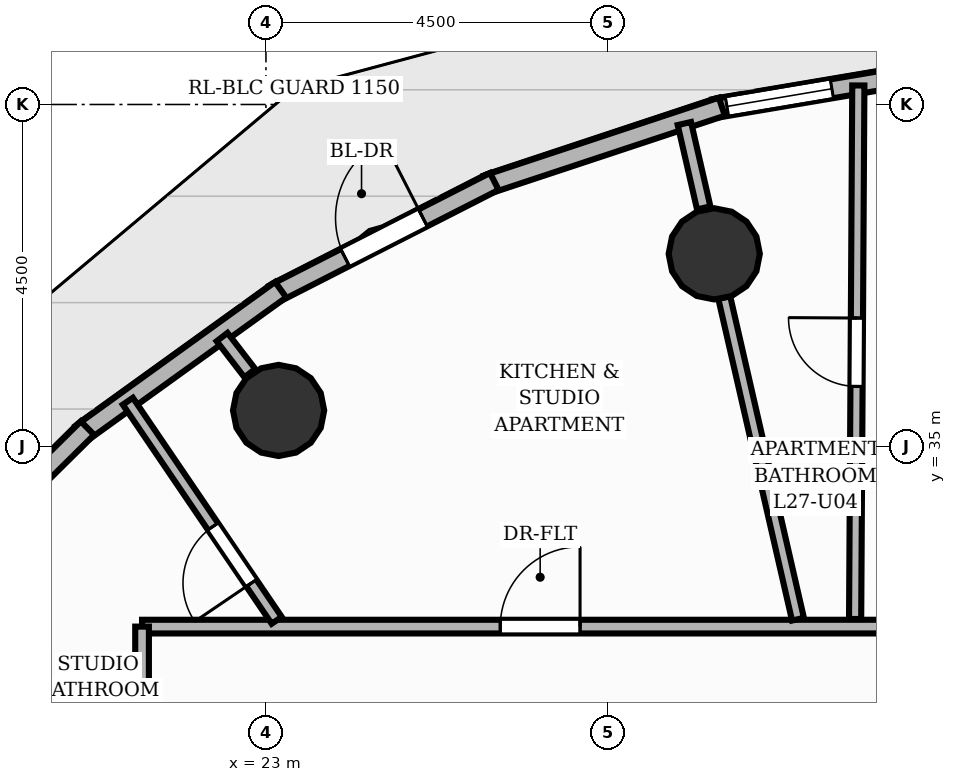
"""IFC4 building model, lengths in metres.
Left out: names, types, materials, properties, quantities, classifications, styles, units other than length and angle.
Written with IfcOpenShell. Run it as: python <this file> out.ifc"""

import sys

from ifc_helpers import new_model, si_unit, direction, frame, frame_2d, origin, origin_2d, place, context, subcontext, project, spatial, rectangle, circle, extrude, element, fill, save


model = new_model("IFC4")
c1 = context("Model", 3, precision=1e-05, world=origin(), true_north=direction((0.0, 1.0)))
c2 = subcontext(c1, "Body", "Model", "MODEL_VIEW")
j1 = project(units=[si_unit("LENGTHUNIT", "METRE"), si_unit("PLANEANGLEUNIT", "RADIAN")], contexts=[c1])
p1 = place(None, origin())
s1 = spatial("IfcSite", under=j1, at=p1, CompositionType="ELEMENT")
p2 = place(p1, origin())
s2 = spatial("IfcBuilding", under=s1, at=p2, CompositionType="ELEMENT")
p3 = place(p2, frame((0.0, 0.0, 93.28)))
s3 = spatial("IfcBuildingStorey", under=s2, at=p3, CompositionType="ELEMENT", Elevation=93.28)
for number, where, z_axis, x_axis in (
    (1, (28.898, 37.535, 0.0), (0.0, 0.0, 1.0), (1.0, 0.0, 0.0)),
    (2, (23.167, 35.474, 0.0), (0.0, 0.0, 1.0), (1.0, 0.0, 0.0)),
):
    element("IfcColumn", number, at=place(p3, frame(where, z_axis=z_axis, x_axis=x_axis)), inside=s3, PredefinedType="COLUMN", context=c2, shape_type="SweptSolid", body=[
        extrude(circle(Radius=0.6, at=origin_2d()), origin(), (0.0, 0.0, 1.0), 3.2),
    ])
p4 = place(p3, frame((28.893, 39.445, 0.0), z_axis=(0.0, 0.0, 1.0), x_axis=(0.986043062305, 0.166490478044, 0.0)))
e3 = element("IfcWall", 3, at=p4, inside=s3, PredefinedType="SOLIDWALL", context=c2, shape_type="SweptSolid", body=[
    extrude(rectangle(XDim=3.236, YDim=0.25, at=frame_2d((1.618, 0.0))), origin(), (0.0, 0.0, 1.0), 2.96),
])
p5 = place(p4, frame((0.175, 0.0, 0.85)))
e4 = element("IfcOpeningElement", 4, at=p5, cuts=e3, PredefinedType="OPENING", context=c2, shape_type="SweptSolid", body=[
    extrude(rectangle(XDim=1.4, YDim=1.55, at=frame_2d((0.7, 0.775))), frame((0.0, 0.135, 0.0), z_axis=(0.0, -1.0, 0.0), x_axis=(1.0, 0.0, 0.0)), (0.0, 0.0, 1.0), 0.27),
])
p6 = place(p3, frame((25.904, 38.445, 0.0), z_axis=(0.0, 0.0, 1.0), x_axis=(0.949206293356, 0.314654433709, 0.0)))
e5 = element("IfcWall", 5, at=p6, inside=s3, PredefinedType="SOLIDWALL", context=c2, shape_type="SweptSolid", body=[
    extrude(rectangle(XDim=3.26, YDim=0.25, at=frame_2d((1.63, 0.0))), origin(), (0.0, 0.0, 1.0), 2.96),
])
p7 = place(p3, frame((23.101, 37.006, 0.0), z_axis=(0.0, 0.0, 1.0), x_axis=(0.89081817606, 0.454359964347, 0.0)))
e6 = element("IfcWall", 6, at=p7, inside=s3, PredefinedType="SOLIDWALL", context=c2, shape_type="SweptSolid", body=[
    extrude(rectangle(XDim=3.26, YDim=0.25, at=frame_2d((1.63, 0.0))), origin(), (0.0, 0.0, 1.0), 2.96),
])
p8 = place(p7, frame((1.055, 0.0, 0.0)))
e7 = element("IfcOpeningElement", 7, at=p8, cuts=e6, PredefinedType="OPENING", context=c2, shape_type="SweptSolid", body=[
    extrude(rectangle(XDim=1.15, YDim=2.2, at=frame_2d((0.575, 1.1))), frame((0.0, 0.135, 0.0), z_axis=(0.0, -1.0, 0.0), x_axis=(1.0, 0.0, 0.0)), (0.0, 0.0, 1.0), 0.27),
])
p9 = place(p3, frame((20.568, 35.171, 0.0), z_axis=(0.0, 0.0, 1.0), x_axis=(0.81131534838, 0.584608762749, 0.0)))
e8 = element("IfcWall", 8, at=p9, inside=s3, PredefinedType="SOLIDWALL", context=c2, shape_type="SweptSolid", body=[
    extrude(rectangle(XDim=3.236, YDim=0.25, at=frame_2d((1.618, 0.0))), origin(), (0.0, 0.0, 1.0), 2.96),
])
p10 = place(p3, frame((18.384, 32.996, 0.0), z_axis=(0.0, 0.0, 1.0), x_axis=(0.710540573889, 0.703656232017, 0.0)))
e9 = element("IfcWall", 9, at=p10, inside=s3, PredefinedType="SOLIDWALL", context=c2, shape_type="SweptSolid", body=[
    extrude(rectangle(XDim=3.192, YDim=0.25, at=frame_2d((1.596, 0.0))), origin(), (0.0, 0.0, 1.0), 2.96),
])
p11 = place(p10, frame((0.771, 0.0, 0.85)))
e10 = element("IfcOpeningElement", 10, at=p11, cuts=e9, PredefinedType="OPENING", context=c2, shape_type="SweptSolid", body=[
    extrude(rectangle(XDim=1.65, YDim=1.55, at=frame_2d((0.825, 0.775))), frame((0.0, 0.135, 0.0), z_axis=(0.0, -1.0, 0.0), x_axis=(1.0, 0.0, 0.0)), (0.0, 0.0, 1.0), 0.27),
])
p12 = place(p3, frame((28.76, 38.139, 0.0), z_axis=(0.0, 0.0, 1.0), x_axis=(-0.223325248633, 0.974743983476, 0.0)))
e11 = element("IfcWall", 11, at=p12, inside=s3, PredefinedType="PARTITIONING", context=c2, shape_type="SweptSolid", body=[
    extrude(rectangle(XDim=1.139, YDim=0.18, at=frame_2d((0.57, 0.0))), origin(), (0.0, 0.0, 1.0), 2.26),
])
p13 = place(p3, frame((22.788, 35.966, 0.0), z_axis=(0.0, 0.0, 1.0), x_axis=(-0.609809319142, 0.792548165279, 0.0)))
e12 = element("IfcWall", 12, at=p13, inside=s3, PredefinedType="PARTITIONING", context=c2, shape_type="SweptSolid", body=[
    extrude(rectangle(XDim=0.599, YDim=0.18, at=frame_2d((0.299, 0.0))), origin(), (0.0, 0.0, 1.0), 2.26),
])
p14 = place(p3, frame((21.37, 32.63, 0.0), z_axis=(0.0, 0.0, 1.0), x_axis=(1.0, 0.0, 0.0)))
e13 = element("IfcWall", 13, at=p14, inside=s3, PredefinedType="PARTITIONING", context=c2, shape_type="SweptSolid", body=[
    extrude(rectangle(XDim=12.686, YDim=0.18, at=frame_2d((6.343, 0.0))), origin(), (0.0, 0.0, 1.0), 2.955),
])
p15 = place(p14, frame((10.499, 0.0, 0.0)))
e14 = element("IfcOpeningElement", 14, at=p15, cuts=e13, PredefinedType="OPENING", context=c2, shape_type="SweptSolid", body=[
    extrude(rectangle(XDim=1.05, YDim=2.15, at=frame_2d((0.525, 1.075))), frame((0.0, 0.1, 0.0), z_axis=(0.0, -1.0, 0.0), x_axis=(1.0, 0.0, 0.0)), (0.0, 0.0, 1.0), 0.2),
])
p16 = place(p14, frame((4.713, 0.0, 0.0)))
e15 = element("IfcOpeningElement", 15, at=p16, cuts=e13, PredefinedType="OPENING", context=c2, shape_type="SweptSolid", body=[
    extrude(rectangle(XDim=1.05, YDim=2.15, at=frame_2d((0.525, 1.075))), frame((0.0, 0.1, 0.0), z_axis=(0.0, -1.0, 0.0), x_axis=(1.0, 0.0, 0.0)), (0.0, 0.0, 1.0), 0.2),
])
p17 = place(p3, frame((21.37, 21.771, 0.0), z_axis=(0.0, 0.0, 1.0), x_axis=(0.0, 1.0, 0.0)))
e16 = element("IfcWall", 16, at=p17, inside=s3, PredefinedType="PARTITIONING", context=c2, shape_type="SweptSolid", body=[
    extrude(rectangle(XDim=10.859, YDim=0.18, at=frame_2d((5.43, 0.0))), origin(), (0.0, 0.0, 1.0), 2.955),
])
p18 = place(p3, frame((30.752, 32.73, 0.0), z_axis=(0.0, 0.0, 1.0), x_axis=(0.006016026892, 0.999981903546, 0.0)))
e17 = element("IfcWall", 17, at=p18, inside=s3, PredefinedType="PLUMBINGWALL", context=c2, shape_type="SweptSolid", body=[
    extrude(rectangle(XDim=7.021, YDim=0.16, at=frame_2d((3.51, 0.0))), origin(), (0.0, 0.0, 1.0), 2.955),
])
p19 = place(p18, frame((3.06, 0.0, 0.0)))
e18 = element("IfcOpeningElement", 18, at=p19, cuts=e17, PredefinedType="OPENING", context=c2, shape_type="SweptSolid", body=[
    extrude(rectangle(XDim=0.9, YDim=2.1, at=frame_2d((0.45, 1.05))), frame((0.0, 0.09, 0.0), z_axis=(0.0, -1.0, 0.0), x_axis=(1.0, 0.0, 0.0)), (0.0, 0.0, 1.0), 0.18),
])
p20 = place(p3, frame((30.0, 32.728, 0.0), z_axis=(0.0, 0.0, 1.0), x_axis=(-0.223409547543, 0.974724665773, 0.0)))
e19 = element("IfcWall", 19, at=p20, inside=s3, PredefinedType="PLUMBINGWALL", context=c2, shape_type="SweptSolid", body=[
    extrude(rectangle(XDim=4.342, YDim=0.16, at=frame_2d((2.171, 0.0))), origin(), (0.0, 0.0, 1.0), 2.26),
])
p21 = place(p3, frame((23.142, 32.713, 0.0), z_axis=(0.0, 0.0, 1.0), x_axis=(-0.561921019334, 0.827190889717, 0.0)))
e20 = element("IfcWall", 20, at=p21, inside=s3, PredefinedType="PLUMBINGWALL", context=c2, shape_type="SweptSolid", body=[
    extrude(rectangle(XDim=3.485, YDim=0.16, at=frame_2d((1.743, 0.0))), origin(), (0.0, 0.0, 1.0), 2.641),
])
p22 = place(p21, frame((0.593, 0.0, 0.0)))
e21 = element("IfcOpeningElement", 21, at=p22, cuts=e20, PredefinedType="OPENING", context=c2, shape_type="SweptSolid", body=[
    extrude(rectangle(XDim=0.9, YDim=2.1, at=frame_2d((0.45, 1.05))), frame((0.0, 0.09, 0.0), z_axis=(0.0, -1.0, 0.0), x_axis=(1.0, 0.0, 0.0)), (0.0, 0.0, 1.0), 0.18),
])
p23 = place(p8, origin())
e22 = element("IfcDoor", 22, at=p23, inside=s3, OperationType="SINGLE_SWING_RIGHT", PredefinedType="DOOR", context=c2, shape_type="SweptSolid", body=[
    extrude(rectangle(XDim=1.15, YDim=2.2, at=frame_2d((0.575, 1.1))), frame((0.0, 0.025, 0.0), z_axis=(0.0, -1.0, 0.0), x_axis=(1.0, 0.0, 0.0)), (0.0, 0.0, 1.0), 0.05),
])
fill(e7, e22)
p24 = place(p5, origin())
e23 = element("IfcWindow", 23, at=p24, inside=s3, PartitioningType="SINGLE_PANEL", PredefinedType="WINDOW", context=c2, shape_type="SweptSolid", body=[
    extrude(rectangle(XDim=1.4, YDim=1.55, at=frame_2d((0.7, 0.775))), frame((0.0, 0.03, 0.0), z_axis=(0.0, -1.0, 0.0), x_axis=(1.0, 0.0, 0.0)), (0.0, 0.0, 1.0), 0.06),
])
fill(e4, e23)
p25 = place(p19, origin())
e24 = element("IfcDoor", 24, at=p25, inside=s3, OperationType="SINGLE_SWING_RIGHT", PredefinedType="DOOR", context=c2, shape_type="SweptSolid", body=[
    extrude(rectangle(XDim=0.9, YDim=2.1, at=frame_2d((0.45, 1.05))), frame((0.0, 0.025, 0.0), z_axis=(0.0, -1.0, 0.0), x_axis=(1.0, 0.0, 0.0)), (0.0, 0.0, 1.0), 0.05),
])
fill(e18, e24)
p26 = place(p16, origin())
e25 = element("IfcDoor", 25, at=p26, inside=s3, OperationType="SINGLE_SWING_RIGHT", PredefinedType="DOOR", context=c2, shape_type="SweptSolid", body=[
    extrude(rectangle(XDim=1.05, YDim=2.15, at=frame_2d((0.525, 1.075))), frame((0.0, 0.025, 0.0), z_axis=(0.0, -1.0, 0.0), x_axis=(1.0, 0.0, 0.0)), (0.0, 0.0, 1.0), 0.05),
])
fill(e15, e25)
p27 = place(p22, origin())
e26 = element("IfcDoor", 26, at=p27, inside=s3, OperationType="SINGLE_SWING_LEFT", PredefinedType="DOOR", context=c2, shape_type="SweptSolid", body=[
    extrude(rectangle(XDim=0.9, YDim=2.1, at=frame_2d((0.45, 1.05))), frame((0.0, 0.025, 0.0), z_axis=(0.0, -1.0, 0.0), x_axis=(1.0, 0.0, 0.0)), (0.0, 0.0, 1.0), 0.05),
])
fill(e21, e26)
save(model, sys.argv[1])
